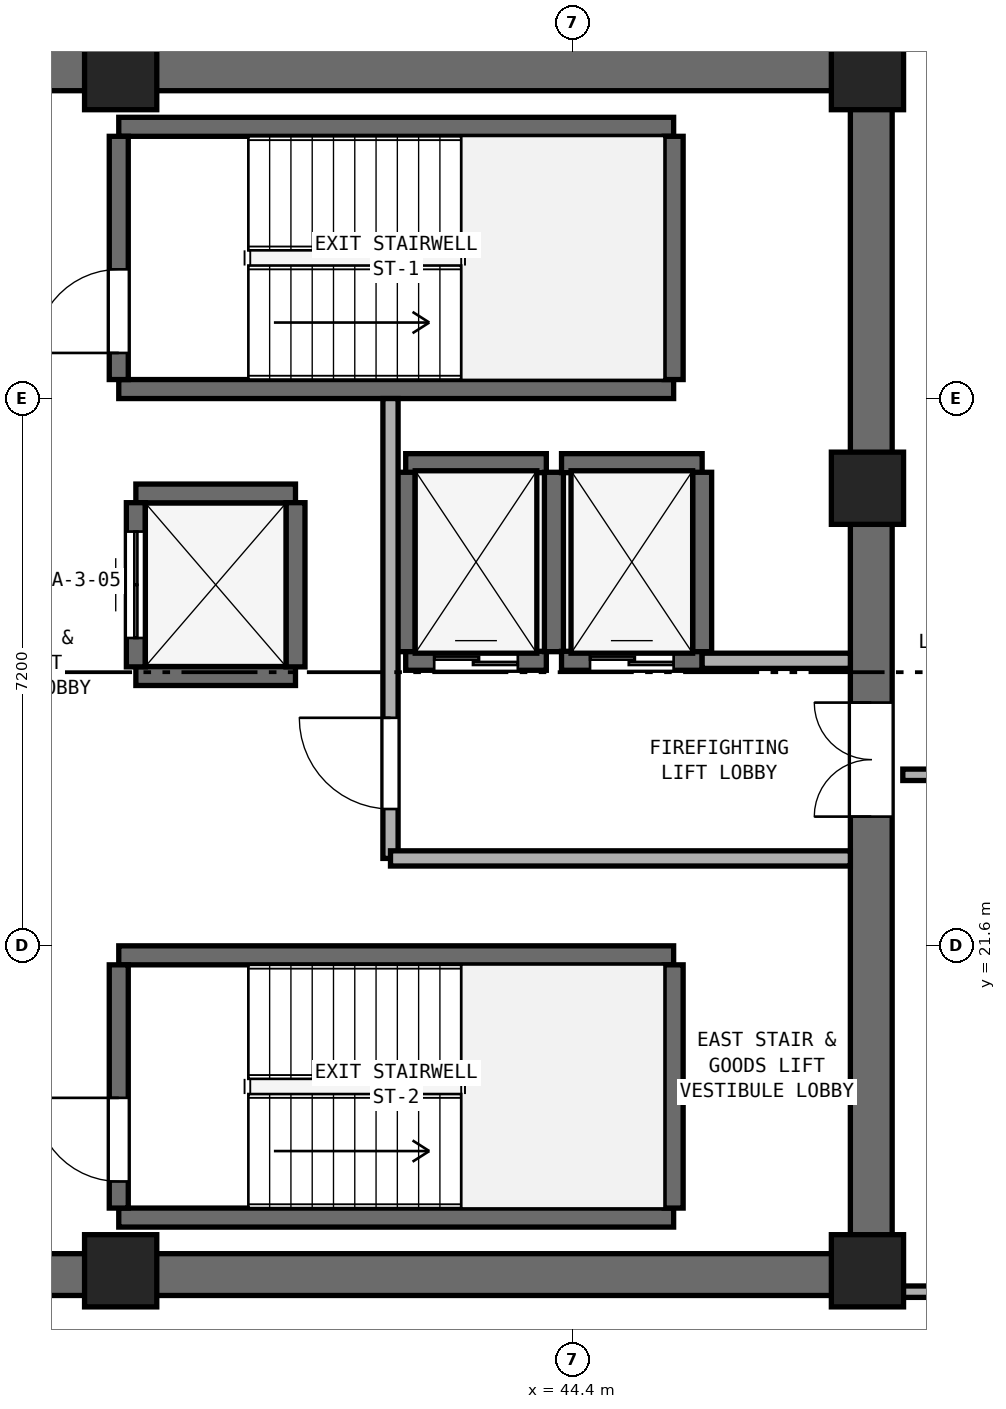
"""IFC4 building model, lengths in metres.
Left out: names, types, materials, properties, quantities, classifications, styles, units other than length and angle.
Written with IfcOpenShell. Run it as: python <this file> out.ifc"""

import sys

from ifc_helpers import new_model, si_unit, direction, frame, frame_2d, origin, origin_2d, place, context, subcontext, project, spatial, rectangle, extrude, element, fill, save


model = new_model("IFC4")
c1 = context("Model", 3, precision=1e-05, world=origin(), true_north=direction((0.0, 1.0)))
c2 = subcontext(c1, "Body", "Model", "MODEL_VIEW")
j1 = project(units=[si_unit("LENGTHUNIT", "METRE"), si_unit("PLANEANGLEUNIT", "RADIAN")], contexts=[c1])
p1 = place(None, origin())
s1 = spatial("IfcSite", under=j1, at=p1, CompositionType="ELEMENT")
p2 = place(p1, origin())
s2 = spatial("IfcBuilding", under=s1, at=p2, CompositionType="ELEMENT")
p3 = place(p2, frame((0.0, 0.0, 170.6)))
s3 = spatial("IfcBuildingStorey", under=s2, at=p3, CompositionType="ELEMENT", Elevation=170.6)
for number, where, z_axis, x_axis in (
    (1, (25.4, 17.275, 0.0), (0.0, 0.0, 1.0), (1.0, 0.0, 0.0)),
    (2, (25.4, 33.125, 0.0), (0.0, 0.0, 1.0), (1.0, 0.0, 0.0)),
):
    element("IfcWall", number, at=place(p3, frame(where, z_axis=z_axis, x_axis=x_axis)), inside=s3, PredefinedType="SHEAR", context=c2, shape_type="SweptSolid", body=[
        extrude(rectangle(XDim=23.2, YDim=0.55, at=frame_2d((11.6, 0.0))), origin(), (0.0, 0.0, 1.0), 3.54),
    ])
p4 = place(p3, frame((48.325, 17.55, 0.0), z_axis=(0.0, 0.0, 1.0), x_axis=(0.0, 1.0, 0.0)))
e3 = element("IfcWall", 3, at=p4, inside=s3, PredefinedType="SHEAR", context=c2, shape_type="SweptSolid", body=[
    extrude(rectangle(XDim=15.3, YDim=0.55, at=frame_2d((7.65, 0.0))), origin(), (0.0, 0.0, 1.0), 3.54),
])
p5 = place(p4, frame((5.75, 0.0, 0.0)))
e4 = element("IfcOpeningElement", 4, at=p5, cuts=e3, PredefinedType="OPENING", context=c2, shape_type="SweptSolid", body=[
    extrude(rectangle(XDim=1.5, YDim=2.15, at=frame_2d((0.75, 1.075))), frame((0.0, 0.285, 0.0), z_axis=(0.0, -1.0, 0.0), x_axis=(1.0, 0.0, 0.0)), (0.0, 0.0, 1.0), 0.57),
])
for number, where, z_axis, x_axis in (
    (5, (38.45, 17.325, 0.0), (0.0, 0.0, 1.0), (1.0, 0.0, 0.0)),
    (6, (48.275, 17.325, 0.0), (0.0, 0.0, 1.0), (1.0, 0.0, 0.0)),
    (7, (48.275, 27.62, 0.0), (0.0, 0.0, 1.0), (1.0, 0.0, 0.0)),
    (8, (48.275, 33.075, 0.0), (0.0, 0.0, 1.0), (1.0, 0.0, 0.0)),
    (9, (38.45, 33.075, 0.0), (0.0, 0.0, 1.0), (1.0, 0.0, 0.0)),
):
    element("IfcColumn", number, at=place(p3, frame(where, z_axis=z_axis, x_axis=x_axis)), inside=s3, PredefinedType="PILASTER", context=c2, shape_type="SweptSolid", body=[
        extrude(rectangle(XDim=0.95, YDim=0.95, at=origin_2d()), origin(), (0.0, 0.0, 1.0), 3.8),
    ])
for number, where, z_axis, x_axis in (
    (10, (38.425, 28.925, 0.0), (0.0, 0.0, 1.0), (1.0, 0.0, 0.0)),
    (11, (38.425, 32.375, 0.0), (0.0, 0.0, 1.0), (1.0, 0.0, 0.0)),
):
    element("IfcWall", number, at=place(p3, frame(where, z_axis=z_axis, x_axis=x_axis)), inside=s3, PredefinedType="SHEAR", context=c2, shape_type="SweptSolid", body=[
        extrude(rectangle(XDim=7.3, YDim=0.25, at=frame_2d((3.65, 0.0))), origin(), (0.0, 0.0, 1.0), 3.54),
    ])
p6 = place(p3, frame((38.425, 29.05, 0.0), z_axis=(0.0, 0.0, 1.0), x_axis=(0.0, 1.0, 0.0)))
e12 = element("IfcWall", 12, at=p6, inside=s3, PredefinedType="SHEAR", context=c2, shape_type="SweptSolid", body=[
    extrude(rectangle(XDim=3.2, YDim=0.25, at=frame_2d((1.6, 0.0))), origin(), (0.0, 0.0, 1.0), 3.54),
])
p7 = place(p6, frame((0.35, 0.0, 0.0)))
e13 = element("IfcOpeningElement", 13, at=p7, cuts=e12, PredefinedType="OPENING", context=c2, shape_type="SweptSolid", body=[
    extrude(rectangle(XDim=1.1, YDim=2.15, at=frame_2d((0.55, 1.075))), frame((0.0, 0.135, 0.0), z_axis=(0.0, -1.0, 0.0), x_axis=(1.0, 0.0, 0.0)), (0.0, 0.0, 1.0), 0.27),
])
p8 = place(p3, frame((45.725, 29.05, 0.0), z_axis=(0.0, 0.0, 1.0), x_axis=(0.0, 1.0, 0.0)))
e14 = element("IfcWall", 14, at=p8, inside=s3, PredefinedType="SHEAR", context=c2, shape_type="SweptSolid", body=[
    extrude(rectangle(XDim=3.2, YDim=0.25, at=frame_2d((1.6, 0.0))), origin(), (0.0, 0.0, 1.0), 3.54),
])
for number, where, z_axis, x_axis in (
    (15, (38.425, 18.025, 0.0), (0.0, 0.0, 1.0), (1.0, 0.0, 0.0)),
    (16, (38.425, 21.475, 0.0), (0.0, 0.0, 1.0), (1.0, 0.0, 0.0)),
):
    element("IfcWall", number, at=place(p3, frame(where, z_axis=z_axis, x_axis=x_axis)), inside=s3, PredefinedType="SHEAR", context=c2, shape_type="SweptSolid", body=[
        extrude(rectangle(XDim=7.3, YDim=0.25, at=frame_2d((3.65, 0.0))), origin(), (0.0, 0.0, 1.0), 3.54),
    ])
p9 = place(p3, frame((38.425, 18.15, 0.0), z_axis=(0.0, 0.0, 1.0), x_axis=(0.0, 1.0, 0.0)))
e17 = element("IfcWall", 17, at=p9, inside=s3, PredefinedType="SHEAR", context=c2, shape_type="SweptSolid", body=[
    extrude(rectangle(XDim=3.2, YDim=0.25, at=frame_2d((1.6, 0.0))), origin(), (0.0, 0.0, 1.0), 3.54),
])
p10 = place(p9, frame((0.35, 0.0, 0.0)))
e18 = element("IfcOpeningElement", 18, at=p10, cuts=e17, PredefinedType="OPENING", context=c2, shape_type="SweptSolid", body=[
    extrude(rectangle(XDim=1.1, YDim=2.15, at=frame_2d((0.55, 1.075))), frame((0.0, 0.135, 0.0), z_axis=(0.0, -1.0, 0.0), x_axis=(1.0, 0.0, 0.0)), (0.0, 0.0, 1.0), 0.27),
])
p11 = place(p3, frame((45.725, 18.15, 0.0), z_axis=(0.0, 0.0, 1.0), x_axis=(0.0, 1.0, 0.0)))
e19 = element("IfcWall", 19, at=p11, inside=s3, PredefinedType="SHEAR", context=c2, shape_type="SweptSolid", body=[
    extrude(rectangle(XDim=3.2, YDim=0.25, at=frame_2d((1.6, 0.0))), origin(), (0.0, 0.0, 1.0), 3.54),
])
p12 = place(p3, frame((42.2, 25.35, 0.0), z_axis=(0.0, 0.0, 1.0), x_axis=(1.0, 0.0, 0.0)))
e20 = element("IfcWall", 20, at=p12, inside=s3, PredefinedType="SHEAR", context=c2, shape_type="SweptSolid", body=[
    extrude(rectangle(XDim=1.85, YDim=0.25, at=frame_2d((0.925, 0.0))), origin(), (0.0, 0.0, 1.0), 3.54),
])
p13 = place(p12, frame((0.375, 0.0, 0.0)))
e21 = element("IfcOpeningElement", 21, at=p13, cuts=e20, PredefinedType="OPENING", context=c2, shape_type="SweptSolid", body=[
    extrude(rectangle(XDim=1.1, YDim=2.15, at=frame_2d((0.55, 1.075))), frame((0.0, 0.135, 0.0), z_axis=(0.0, -1.0, 0.0), x_axis=(1.0, 0.0, 0.0)), (0.0, 0.0, 1.0), 0.27),
])
p14 = place(p3, frame((42.2, 27.95, 0.0), z_axis=(0.0, 0.0, 1.0), x_axis=(1.0, 0.0, 0.0)))
e22 = element("IfcWall", 22, at=p14, inside=s3, PredefinedType="SHEAR", context=c2, shape_type="SweptSolid", body=[
    extrude(rectangle(XDim=1.85, YDim=0.25, at=frame_2d((0.925, 0.0))), origin(), (0.0, 0.0, 1.0), 3.54),
])
for number, where, z_axis, x_axis in (
    (23, (42.2, 25.47, 0.0), (0.0, 0.0, 1.0), (0.0, 1.0, 0.0)),
    (24, (44.15, 25.47, 0.0), (0.0, 0.0, 1.0), (0.0, 1.0, 0.0)),
):
    element("IfcWall", number, at=place(p3, frame(where, z_axis=z_axis, x_axis=x_axis)), inside=s3, PredefinedType="SHEAR", context=c2, shape_type="SweptSolid", body=[
        extrude(rectangle(XDim=2.36, YDim=0.25, at=frame_2d((1.18, 0.0))), origin(), (0.0, 0.0, 1.0), 3.54),
    ])
p15 = place(p3, frame((44.25, 25.35, 0.0), z_axis=(0.0, 0.0, 1.0), x_axis=(1.0, 0.0, 0.0)))
e25 = element("IfcWall", 25, at=p15, inside=s3, PredefinedType="SHEAR", context=c2, shape_type="SweptSolid", body=[
    extrude(rectangle(XDim=1.85, YDim=0.25, at=frame_2d((0.925, 0.0))), origin(), (0.0, 0.0, 1.0), 3.54),
])
p16 = place(p15, frame((0.375, 0.0, 0.0)))
e26 = element("IfcOpeningElement", 26, at=p16, cuts=e25, PredefinedType="OPENING", context=c2, shape_type="SweptSolid", body=[
    extrude(rectangle(XDim=1.1, YDim=2.15, at=frame_2d((0.55, 1.075))), frame((0.0, 0.135, 0.0), z_axis=(0.0, -1.0, 0.0), x_axis=(1.0, 0.0, 0.0)), (0.0, 0.0, 1.0), 0.27),
])
p17 = place(p3, frame((44.25, 27.95, 0.0), z_axis=(0.0, 0.0, 1.0), x_axis=(1.0, 0.0, 0.0)))
e27 = element("IfcWall", 27, at=p17, inside=s3, PredefinedType="SHEAR", context=c2, shape_type="SweptSolid", body=[
    extrude(rectangle(XDim=1.85, YDim=0.25, at=frame_2d((0.925, 0.0))), origin(), (0.0, 0.0, 1.0), 3.54),
])
p18 = place(p3, frame((46.1, 25.47, 0.0), z_axis=(0.0, 0.0, 1.0), x_axis=(0.0, 1.0, 0.0)))
e28 = element("IfcWall", 28, at=p18, inside=s3, PredefinedType="SHEAR", context=c2, shape_type="SweptSolid", body=[
    extrude(rectangle(XDim=2.36, YDim=0.25, at=frame_2d((1.18, 0.0))), origin(), (0.0, 0.0, 1.0), 3.54),
])
for number, where, z_axis, x_axis in (
    (29, (38.65, 25.15, 0.0), (0.0, 0.0, 1.0), (1.0, 0.0, 0.0)),
    (30, (38.65, 27.55, 0.0), (0.0, 0.0, 1.0), (1.0, 0.0, 0.0)),
):
    element("IfcWall", number, at=place(p3, frame(where, z_axis=z_axis, x_axis=x_axis)), inside=s3, PredefinedType="SHEAR", context=c2, shape_type="SweptSolid", body=[
        extrude(rectangle(XDim=2.1, YDim=0.25, at=frame_2d((1.05, 0.0))), origin(), (0.0, 0.0, 1.0), 3.54),
    ])
p19 = place(p3, frame((38.65, 25.27, 0.0), z_axis=(0.0, 0.0, 1.0), x_axis=(0.0, 1.0, 0.0)))
e31 = element("IfcWall", 31, at=p19, inside=s3, PredefinedType="SHEAR", context=c2, shape_type="SweptSolid", body=[
    extrude(rectangle(XDim=2.16, YDim=0.25, at=frame_2d((1.08, 0.0))), origin(), (0.0, 0.0, 1.0), 3.54),
])
p20 = place(p19, frame((0.38, 0.0, 0.0)))
e32 = element("IfcOpeningElement", 32, at=p20, cuts=e31, PredefinedType="OPENING", context=c2, shape_type="SweptSolid", body=[
    extrude(rectangle(XDim=1.4, YDim=2.2, at=frame_2d((0.7, 1.1))), frame((0.0, 0.135, 0.0), z_axis=(0.0, -1.0, 0.0), x_axis=(1.0, 0.0, 0.0)), (0.0, 0.0, 1.0), 0.27),
])
p21 = place(p3, frame((40.75, 25.27, 0.0), z_axis=(0.0, 0.0, 1.0), x_axis=(0.0, 1.0, 0.0)))
e33 = element("IfcWall", 33, at=p21, inside=s3, PredefinedType="SHEAR", context=c2, shape_type="SweptSolid", body=[
    extrude(rectangle(XDim=2.16, YDim=0.25, at=frame_2d((1.08, 0.0))), origin(), (0.0, 0.0, 1.0), 3.54),
])
p22 = place(p3, frame((42.0, 22.75, 0.0), z_axis=(0.0, 0.0, 1.0), x_axis=(0.0, 1.0, 0.0)))
e34 = element("IfcWall", 34, at=p22, inside=s3, PredefinedType="SOLIDWALL", context=c2, shape_type="SweptSolid", body=[
    extrude(rectangle(XDim=6.05, YDim=0.2, at=frame_2d((3.025, 0.0))), origin(), (0.0, 0.0, 1.0), 3.54),
])
p23 = place(p22, frame((0.65, 0.0, 0.0)))
e35 = element("IfcOpeningElement", 35, at=p23, cuts=e34, PredefinedType="OPENING", context=c2, shape_type="SweptSolid", body=[
    extrude(rectangle(XDim=1.2, YDim=2.15, at=frame_2d((0.6, 1.075))), frame((0.0, 0.11, 0.0), z_axis=(0.0, -1.0, 0.0), x_axis=(1.0, 0.0, 0.0)), (0.0, 0.0, 1.0), 0.22),
])
p24 = place(p3, frame((42.0, 22.75, 0.0), z_axis=(0.0, 0.0, 1.0), x_axis=(1.0, 0.0, 0.0)))
e36 = element("IfcWall", 36, at=p24, inside=s3, PredefinedType="SOLIDWALL", context=c2, shape_type="SweptSolid", body=[
    extrude(rectangle(XDim=6.05, YDim=0.2, at=frame_2d((3.025, 0.0))), origin(), (0.0, 0.0, 1.0), 3.54),
])
p25 = place(p3, frame((46.1, 25.35, 0.0), z_axis=(0.0, 0.0, 1.0), x_axis=(1.0, 0.0, 0.0)))
e37 = element("IfcWall", 37, at=p25, inside=s3, PredefinedType="SOLIDWALL", context=c2, shape_type="SweptSolid", body=[
    extrude(rectangle(XDim=1.95, YDim=0.2, at=frame_2d((0.975, 0.0))), origin(), (0.0, 0.0, 1.0), 3.54),
])
p26 = place(p3, frame((48.74, 17.05, 0.0), z_axis=(0.0, 0.0, 1.0), x_axis=(1.0, 0.0, 0.0)))
e38 = element("IfcWall", 38, at=p26, inside=s3, PredefinedType="PARTITIONING", context=c2, shape_type="SweptSolid", body=[
    extrude(rectangle(XDim=12.855, YDim=0.15, at=frame_2d((6.427, 0.0))), origin(), (0.0, 0.0, 1.0), 2.923),
])
p27 = place(p3, frame((48.74, 23.85, 0.0), z_axis=(0.0, 0.0, 1.0), x_axis=(1.0, 0.0, 0.0)))
e39 = element("IfcWall", 39, at=p27, inside=s3, PredefinedType="PARTITIONING", context=c2, shape_type="SweptSolid", body=[
    extrude(rectangle(XDim=12.855, YDim=0.15, at=frame_2d((6.427, 0.0))), origin(), (0.0, 0.0, 1.0), 3.54),
])
p28 = place(p27, frame((5.978, 0.0, 0.0)))
e40 = element("IfcOpeningElement", 40, at=p28, cuts=e39, PredefinedType="OPENING", context=c2, shape_type="SweptSolid", body=[
    extrude(rectangle(XDim=0.9, YDim=2.1, at=frame_2d((0.45, 1.05))), frame((0.0, 0.085, 0.0), z_axis=(0.0, -1.0, 0.0), x_axis=(1.0, 0.0, 0.0)), (0.0, 0.0, 1.0), 0.17),
])
p29 = place(p7, origin())
e41 = element("IfcDoor", 41, at=p29, inside=s3, OperationType="SINGLE_SWING_LEFT", PredefinedType="DOOR", context=c2, shape_type="SweptSolid", body=[
    extrude(rectangle(XDim=1.1, YDim=2.15, at=frame_2d((0.55, 1.075))), frame((0.0, 0.025, 0.0), z_axis=(0.0, -1.0, 0.0), x_axis=(1.0, 0.0, 0.0)), (0.0, 0.0, 1.0), 0.05),
])
fill(e13, e41)
p30 = place(p10, origin())
e42 = element("IfcDoor", 42, at=p30, inside=s3, OperationType="SINGLE_SWING_RIGHT", PredefinedType="DOOR", context=c2, shape_type="SweptSolid", body=[
    extrude(rectangle(XDim=1.1, YDim=2.15, at=frame_2d((0.55, 1.075))), frame((0.0, 0.025, 0.0), z_axis=(0.0, -1.0, 0.0), x_axis=(1.0, 0.0, 0.0)), (0.0, 0.0, 1.0), 0.05),
])
fill(e18, e42)
p31 = place(p13, origin())
e43 = element("IfcDoor", 43, at=p31, inside=s3, OperationType="DOUBLE_DOOR_SLIDING", PredefinedType="DOOR", context=c2, shape_type="SweptSolid", body=[
    extrude(rectangle(XDim=1.1, YDim=2.15, at=frame_2d((0.55, 1.075))), frame((0.0, 0.025, 0.0), z_axis=(0.0, -1.0, 0.0), x_axis=(1.0, 0.0, 0.0)), (0.0, 0.0, 1.0), 0.05),
])
fill(e21, e43)
p32 = place(p16, origin())
e44 = element("IfcDoor", 44, at=p32, inside=s3, OperationType="DOUBLE_DOOR_SLIDING", PredefinedType="DOOR", context=c2, shape_type="SweptSolid", body=[
    extrude(rectangle(XDim=1.1, YDim=2.15, at=frame_2d((0.55, 1.075))), frame((0.0, 0.025, 0.0), z_axis=(0.0, -1.0, 0.0), x_axis=(1.0, 0.0, 0.0)), (0.0, 0.0, 1.0), 0.05),
])
fill(e26, e44)
p33 = place(p20, origin())
e45 = element("IfcDoor", 45, at=p33, inside=s3, OperationType="DOUBLE_DOOR_SLIDING", PredefinedType="DOOR", context=c2, shape_type="SweptSolid", body=[
    extrude(rectangle(XDim=1.4, YDim=2.2, at=frame_2d((0.7, 1.1))), frame((0.0, 0.025, 0.0), z_axis=(0.0, -1.0, 0.0), x_axis=(1.0, 0.0, 0.0)), (0.0, 0.0, 1.0), 0.05),
])
fill(e32, e45)
p34 = place(p23, origin())
e46 = element("IfcDoor", 46, at=p34, inside=s3, OperationType="SINGLE_SWING_RIGHT", PredefinedType="DOOR", context=c2, shape_type="SweptSolid", body=[
    extrude(rectangle(XDim=1.2, YDim=2.15, at=frame_2d((0.6, 1.075))), frame((0.0, 0.025, 0.0), z_axis=(0.0, -1.0, 0.0), x_axis=(1.0, 0.0, 0.0)), (0.0, 0.0, 1.0), 0.05),
])
fill(e35, e46)
p35 = place(p5, origin())
e47 = element("IfcDoor", 47, at=p35, inside=s3, OperationType="DOUBLE_DOOR_SINGLE_SWING", PredefinedType="DOOR", context=c2, shape_type="SweptSolid", body=[
    extrude(rectangle(XDim=1.5, YDim=2.15, at=frame_2d((0.75, 1.075))), frame((0.0, 0.025, 0.0), z_axis=(0.0, -1.0, 0.0), x_axis=(1.0, 0.0, 0.0)), (0.0, 0.0, 1.0), 0.05),
])
fill(e4, e47)
save(model, sys.argv[1])
